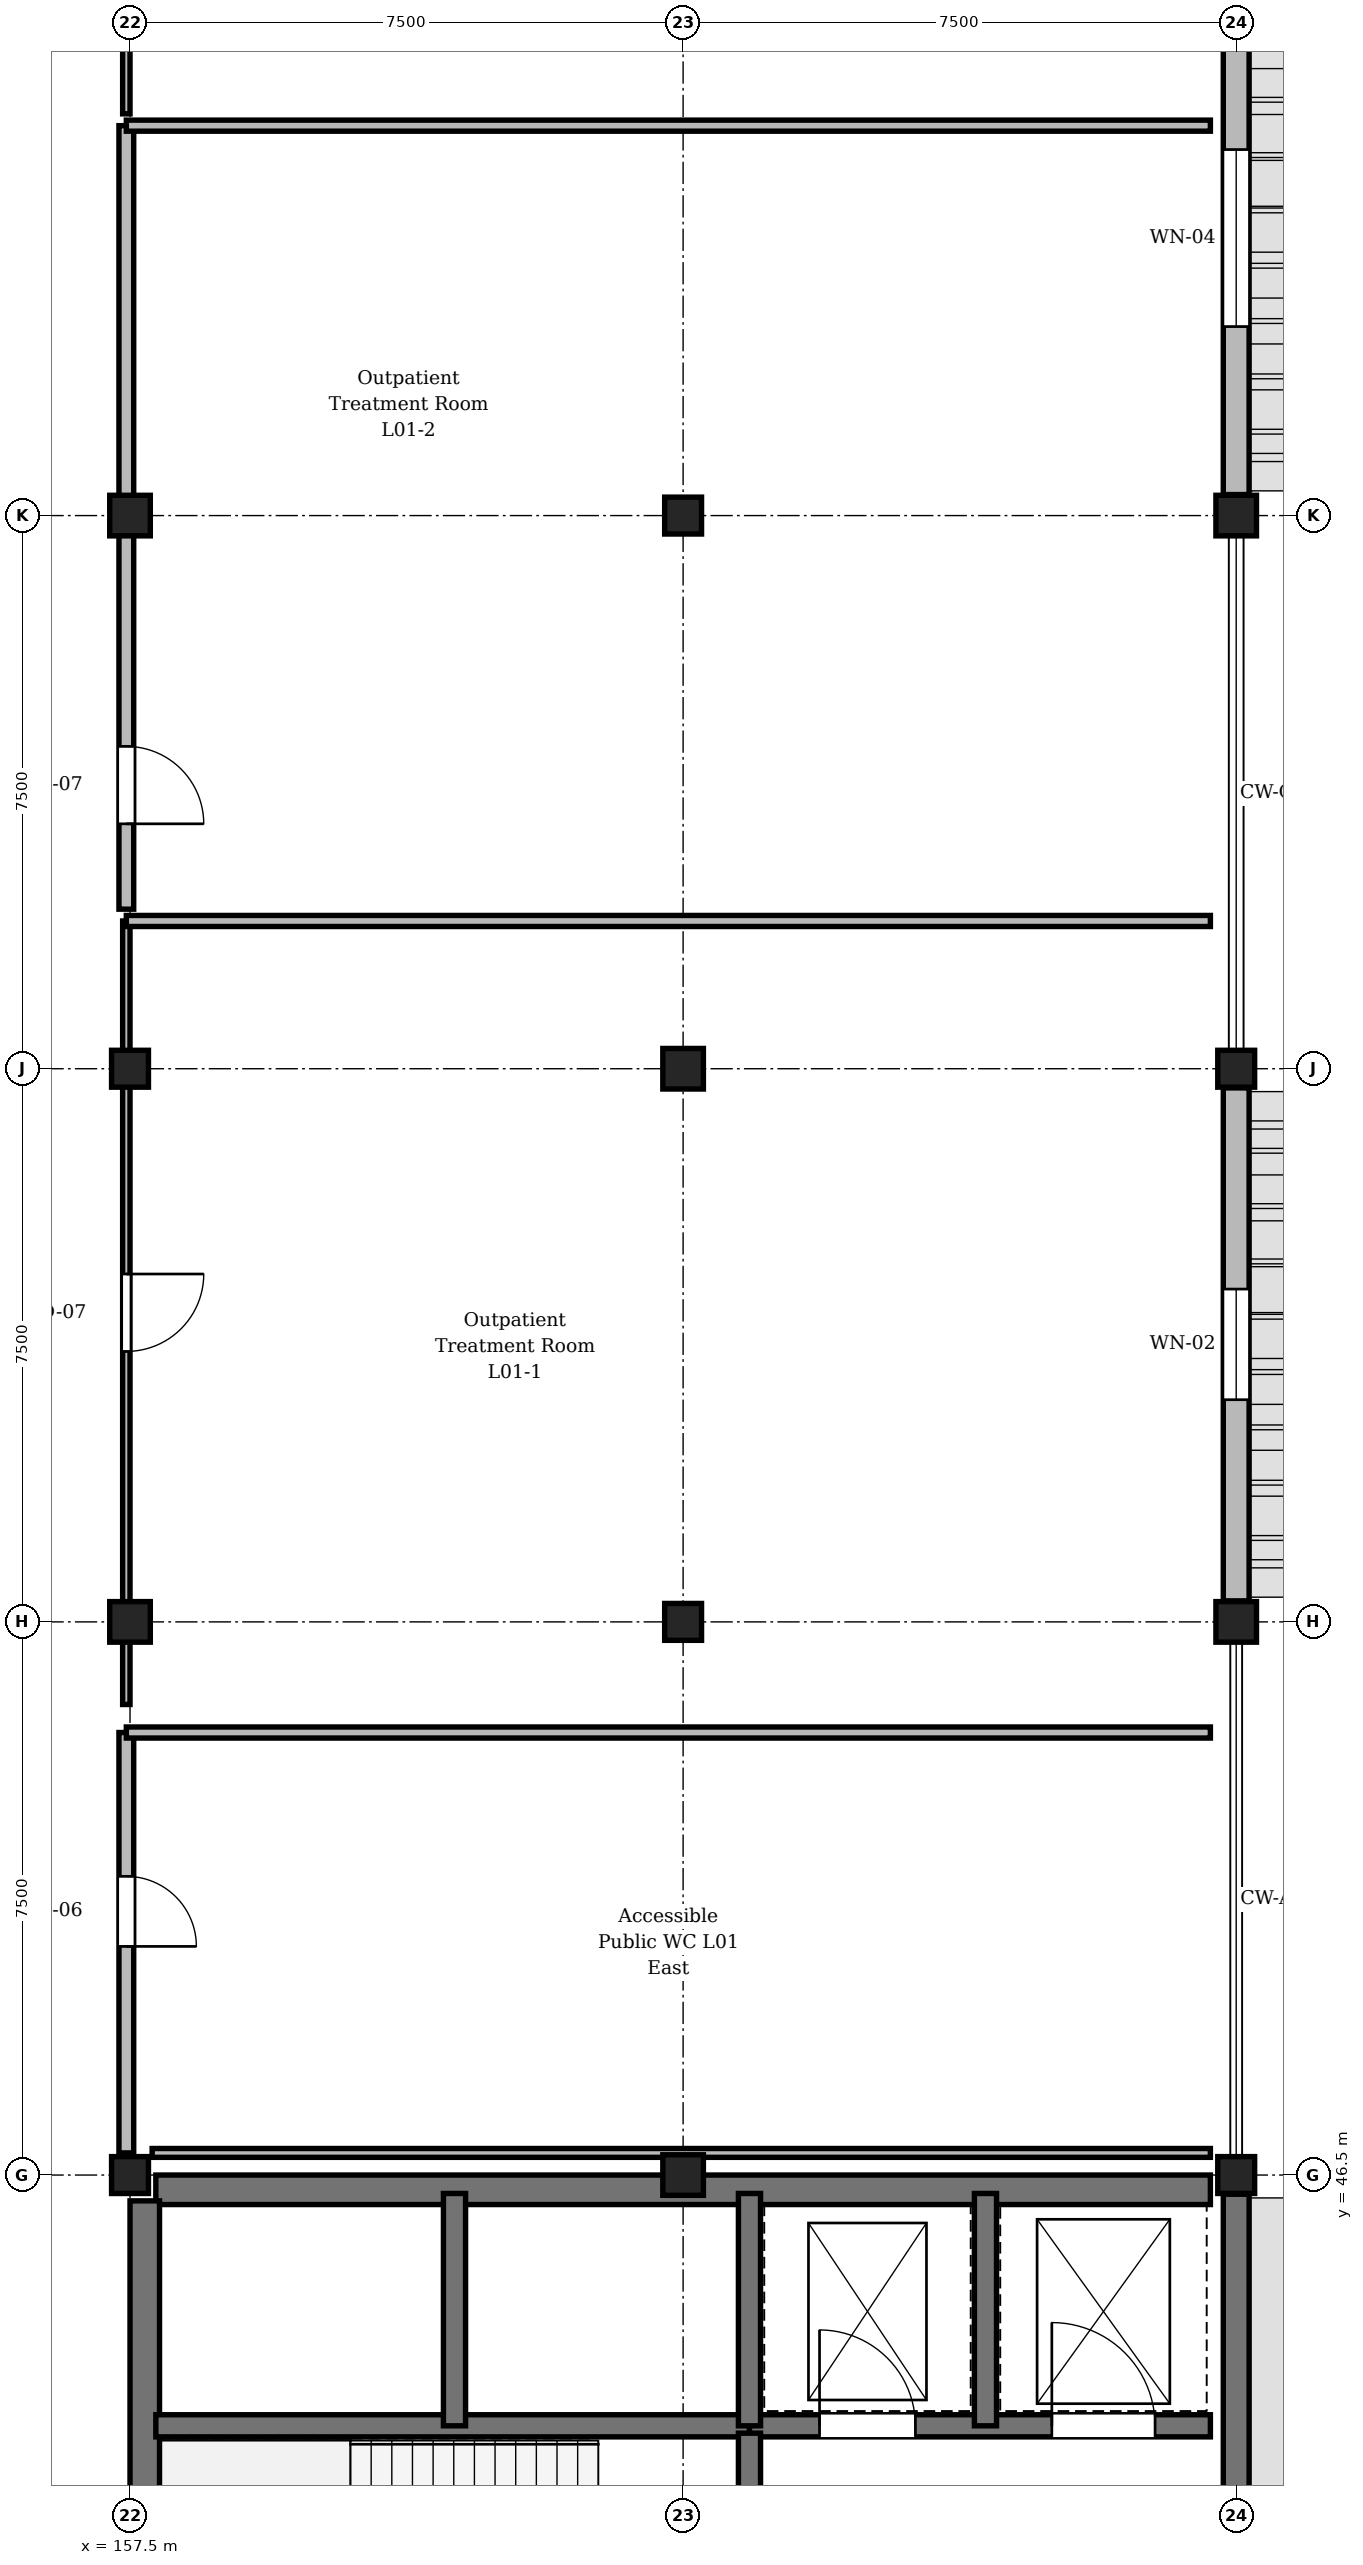
"""IFC4 building model, lengths in metres.
Left out: names, types, materials, properties, quantities, classifications, styles, units other than length and angle.
Written with IfcOpenShell. Run it as: python <this file> out.ifc"""

import sys

from ifc_helpers import new_model, si_unit, direction, frame, frame_2d, origin, origin_2d, place, context, subcontext, project, spatial, rectangle, extrude, element, fill, save


model = new_model("IFC4")
c1 = context("Model", 3, precision=1e-05, world=origin(), true_north=direction((0.0, 1.0)))
c2 = subcontext(c1, "Body", "Model", "MODEL_VIEW")
j1 = project(units=[si_unit("LENGTHUNIT", "METRE"), si_unit("PLANEANGLEUNIT", "RADIAN")], contexts=[c1])
p1 = place(None, origin())
s1 = spatial("IfcSite", under=j1, at=p1, CompositionType="ELEMENT")
p2 = place(p1, origin())
s2 = spatial("IfcBuilding", under=s1, at=p2, CompositionType="ELEMENT")
p3 = place(p2, frame((0.0, 0.0, 4.8)))
s3 = spatial("IfcBuildingStorey", under=s2, at=p3, CompositionType="ELEMENT", Elevation=4.8)
p4 = place(p3, frame((157.5, 46.5, 0.0), z_axis=(0.0, 0.0, 1.0), x_axis=(1.0, 0.0, 0.0)))
e1 = element("IfcColumn", 1, at=p4, inside=s3, PredefinedType="COLUMN", context=c2, shape_type="SweptSolid", body=[
    extrude(rectangle(XDim=0.5, YDim=0.5, at=origin_2d()), origin(), (0.0, 0.0, 1.0), 4.5),
])
p5 = place(p3, frame((157.5, 54.0, 0.0), z_axis=(0.0, 0.0, 1.0), x_axis=(1.0, 0.0, 0.0)))
e2 = element("IfcColumn", 2, at=p5, inside=s3, PredefinedType="COLUMN", context=c2, shape_type="SweptSolid", body=[
    extrude(rectangle(XDim=0.55, YDim=0.55, at=origin_2d()), origin(), (0.0, 0.0, 1.0), 4.5),
])
p6 = place(p3, frame((157.5, 61.5, 0.0), z_axis=(0.0, 0.0, 1.0), x_axis=(1.0, 0.0, 0.0)))
e3 = element("IfcColumn", 3, at=p6, inside=s3, PredefinedType="COLUMN", context=c2, shape_type="SweptSolid", body=[
    extrude(rectangle(XDim=0.5, YDim=0.5, at=origin_2d()), origin(), (0.0, 0.0, 1.0), 4.5),
])
for number, where, z_axis, x_axis in (
    (4, (157.5, 69.0, 0.0), (0.0, 0.0, 1.0), (1.0, 0.0, 0.0)),
    (5, (165.0, 46.5, 0.0), (0.0, 0.0, 1.0), (1.0, 0.0, 0.0)),
):
    element("IfcColumn", number, at=place(p3, frame(where, z_axis=z_axis, x_axis=x_axis)), inside=s3, PredefinedType="COLUMN", context=c2, shape_type="SweptSolid", body=[
        extrude(rectangle(XDim=0.55, YDim=0.55, at=origin_2d()), origin(), (0.0, 0.0, 1.0), 4.5),
    ])
p7 = place(p3, frame((165.0, 54.0, 0.0), z_axis=(0.0, 0.0, 1.0), x_axis=(1.0, 0.0, 0.0)))
e6 = element("IfcColumn", 6, at=p7, inside=s3, PredefinedType="COLUMN", context=c2, shape_type="SweptSolid", body=[
    extrude(rectangle(XDim=0.5, YDim=0.5, at=origin_2d()), origin(), (0.0, 0.0, 1.0), 4.5),
])
p8 = place(p3, frame((165.0, 61.5, 0.0), z_axis=(0.0, 0.0, 1.0), x_axis=(1.0, 0.0, 0.0)))
e7 = element("IfcColumn", 7, at=p8, inside=s3, PredefinedType="COLUMN", context=c2, shape_type="SweptSolid", body=[
    extrude(rectangle(XDim=0.55, YDim=0.55, at=origin_2d()), origin(), (0.0, 0.0, 1.0), 4.5),
])
for number, where, z_axis, x_axis in (
    (8, (165.0, 69.0, 0.0), (0.0, 0.0, 1.0), (1.0, 0.0, 0.0)),
    (9, (172.5, 46.5, 0.0), (0.0, 0.0, 1.0), (1.0, 0.0, 0.0)),
):
    element("IfcColumn", number, at=place(p3, frame(where, z_axis=z_axis, x_axis=x_axis)), inside=s3, PredefinedType="COLUMN", context=c2, shape_type="SweptSolid", body=[
        extrude(rectangle(XDim=0.5, YDim=0.5, at=origin_2d()), origin(), (0.0, 0.0, 1.0), 4.5),
    ])
p9 = place(p3, frame((172.5, 54.0, 0.0), z_axis=(0.0, 0.0, 1.0), x_axis=(1.0, 0.0, 0.0)))
e10 = element("IfcColumn", 10, at=p9, inside=s3, PredefinedType="COLUMN", context=c2, shape_type="SweptSolid", body=[
    extrude(rectangle(XDim=0.55, YDim=0.55, at=origin_2d()), origin(), (0.0, 0.0, 1.0), 4.5),
])
p10 = place(p3, frame((172.5, 61.5, 0.0), z_axis=(0.0, 0.0, 1.0), x_axis=(1.0, 0.0, 0.0)))
e11 = element("IfcColumn", 11, at=p10, inside=s3, PredefinedType="COLUMN", context=c2, shape_type="SweptSolid", body=[
    extrude(rectangle(XDim=0.5, YDim=0.5, at=origin_2d()), origin(), (0.0, 0.0, 1.0), 4.5),
])
p11 = place(p3, frame((172.5, 69.0, 0.0), z_axis=(0.0, 0.0, 1.0), x_axis=(1.0, 0.0, 0.0)))
e12 = element("IfcColumn", 12, at=p11, inside=s3, PredefinedType="COLUMN", context=c2, shape_type="SweptSolid", body=[
    extrude(rectangle(XDim=0.55, YDim=0.55, at=origin_2d()), origin(), (0.0, 0.0, 1.0), 4.5),
])
p12 = place(p3, frame((172.5, 46.24, 0.0), z_axis=(0.0, 0.0, 1.0), x_axis=(0.0, -1.0, 0.0)))
e13 = element("IfcWall", 13, at=p12, inside=s3, PredefinedType="SHEAR", context=c2, shape_type="SweptSolid", body=[
    extrude(rectangle(XDim=6.955, YDim=0.35, at=frame_2d((3.478, 0.0))), origin(), (0.0, 0.0, 1.0), 4.18),
])
p13 = place(p3, frame((172.5, 61.24, 0.0), z_axis=(0.0, 0.0, 1.0), x_axis=(0.0, -1.0, 0.0)))
e14 = element("IfcWall", 14, at=p13, inside=s3, PredefinedType="STANDARD", context=c2, shape_type="SweptSolid", body=[
    extrude(rectangle(XDim=6.955, YDim=0.35, at=frame_2d((3.478, 0.0))), origin(), (0.0, 0.0, 1.0), 3.63),
])
p14 = place(p13, frame((2.728, 0.0, 0.9)))
e15 = element("IfcOpeningElement", 15, at=p14, cuts=e14, PredefinedType="OPENING", context=c2, shape_type="SweptSolid", body=[
    extrude(rectangle(XDim=1.5, YDim=2.4, at=frame_2d((0.75, 1.2))), frame((0.0, 0.185, 0.0), z_axis=(0.0, -1.0, 0.0), x_axis=(1.0, 0.0, 0.0)), (0.0, 0.0, 1.0), 0.37),
])
p15 = place(p3, frame((172.5, 76.24, 0.0), z_axis=(0.0, 0.0, 1.0), x_axis=(0.0, -1.0, 0.0)))
e16 = element("IfcWall", 16, at=p15, inside=s3, PredefinedType="STANDARD", context=c2, shape_type="SweptSolid", body=[
    extrude(rectangle(XDim=6.955, YDim=0.35, at=frame_2d((3.478, 0.0))), origin(), (0.0, 0.0, 1.0), 3.63),
])
p16 = place(p15, frame((2.278, 0.0, 0.9)))
e17 = element("IfcOpeningElement", 17, at=p16, cuts=e16, PredefinedType="OPENING", context=c2, shape_type="SweptSolid", body=[
    extrude(rectangle(XDim=2.4, YDim=2.45, at=frame_2d((1.2, 1.225))), frame((0.0, 0.185, 0.0), z_axis=(0.0, -1.0, 0.0), x_axis=(1.0, 0.0, 0.0)), (0.0, 0.0, 1.0), 0.37),
])
p17 = place(p3, frame((157.85, 46.3, 0.0), z_axis=(0.0, 0.0, 1.0), x_axis=(1.0, 0.0, 0.0)))
e18 = element("IfcWall", 18, at=p17, inside=s3, PredefinedType="SHEAR", context=c2, shape_type="SweptSolid", body=[
    extrude(rectangle(XDim=14.3, YDim=0.4, at=frame_2d((7.15, 0.0))), origin(), (0.0, 0.0, 1.0), 4.18),
])
p18 = place(p3, frame((157.7, 39.35, 0.0), z_axis=(0.0, 0.0, 1.0), x_axis=(0.0, 1.0, 0.0)))
e19 = element("IfcWall", 19, at=p18, inside=s3, PredefinedType="SHEAR", context=c2, shape_type="SweptSolid", body=[
    extrude(rectangle(XDim=6.8, YDim=0.4, at=frame_2d((3.4, 0.0))), origin(), (0.0, 0.0, 1.0), 4.18),
])
p19 = place(p3, frame((157.85, 43.1, 0.0), z_axis=(0.0, 0.0, 1.0), x_axis=(1.0, 0.0, 0.0)))
e20 = element("IfcWall", 20, at=p19, inside=s3, PredefinedType="SHEAR", context=c2, shape_type="SweptSolid", body=[
    extrude(rectangle(XDim=8.05, YDim=0.3, at=frame_2d((4.025, 0.0))), origin(), (0.0, 0.0, 1.0), 4.18),
])
p20 = place(p3, frame((165.9, 43.1, 0.0), z_axis=(0.0, 0.0, 1.0), x_axis=(1.0, 0.0, 0.0)))
e21 = element("IfcWall", 21, at=p20, inside=s3, PredefinedType="SHEAR", context=c2, shape_type="SweptSolid", body=[
    extrude(rectangle(XDim=6.25, YDim=0.3, at=frame_2d((3.125, 0.0))), origin(), (0.0, 0.0, 1.0), 4.18),
])
p21 = place(p20, frame((0.95, 0.0, 0.0)))
e22 = element("IfcOpeningElement", 22, at=p21, cuts=e21, PredefinedType="OPENING", context=c2, shape_type="SweptSolid", body=[
    extrude(rectangle(XDim=1.3, YDim=2.2, at=frame_2d((0.65, 1.1))), frame((0.0, 0.16, 0.0), z_axis=(0.0, -1.0, 0.0), x_axis=(1.0, 0.0, 0.0)), (0.0, 0.0, 1.0), 0.32),
])
p22 = place(p20, frame((4.1, 0.0, 0.0)))
e23 = element("IfcOpeningElement", 23, at=p22, cuts=e21, PredefinedType="OPENING", context=c2, shape_type="SweptSolid", body=[
    extrude(rectangle(XDim=1.4, YDim=2.25, at=frame_2d((0.7, 1.125))), frame((0.0, 0.16, 0.0), z_axis=(0.0, -1.0, 0.0), x_axis=(1.0, 0.0, 0.0)), (0.0, 0.0, 1.0), 0.32),
])
p23 = place(p3, frame((165.9, 43.0, 0.0), z_axis=(0.0, 0.0, 1.0), x_axis=(0.0, -1.0, 0.0)))
e24 = element("IfcWall", 24, at=p23, inside=s3, PredefinedType="SHEAR", context=c2, shape_type="SweptSolid", body=[
    extrude(rectangle(XDim=3.65, YDim=0.3, at=frame_2d((1.825, 0.0))), origin(), (0.0, 0.0, 1.0), 4.18),
])
p24 = place(p23, frame((1.22, 0.0, 0.0)))
e25 = element("IfcOpeningElement", 25, at=p24, cuts=e24, PredefinedType="OPENING", context=c2, shape_type="SweptSolid", body=[
    extrude(rectangle(XDim=1.2, YDim=2.25, at=frame_2d((0.6, 1.125))), frame((0.0, 0.16, 0.0), z_axis=(0.0, -1.0, 0.0), x_axis=(1.0, 0.0, 0.0)), (0.0, 0.0, 1.0), 0.32),
])
for number, where, z_axis, x_axis in (
    (26, (161.9, 43.1, 0.0), (0.0, 0.0, 1.0), (0.0, 1.0, 0.0)),
    (27, (165.9, 43.1, 0.0), (0.0, 0.0, 1.0), (0.0, 1.0, 0.0)),
    (28, (169.1, 43.1, 0.0), (0.0, 0.0, 1.0), (0.0, 1.0, 0.0)),
):
    element("IfcWall", number, at=place(p3, frame(where, z_axis=z_axis, x_axis=x_axis)), inside=s3, PredefinedType="SHEAR", context=c2, shape_type="SweptSolid", body=[
        extrude(rectangle(XDim=3.15, YDim=0.3, at=frame_2d((1.575, 0.0))), origin(), (0.0, 0.0, 1.0), 4.18),
    ])
p25 = place(p3, frame((157.45, 52.5, 0.0), z_axis=(0.0, 0.0, 1.0), x_axis=(0.0, -1.0, 0.0)))
e29 = element("IfcWall", 29, at=p25, inside=s3, PredefinedType="STANDARD", context=c2, shape_type="SweptSolid", body=[
    extrude(rectangle(XDim=5.7, YDim=0.2, at=frame_2d((2.85, 0.0))), origin(), (0.0, 0.0, 1.0), 3.565),
])
p26 = place(p25, frame((1.95, 0.0, 0.0)))
e30 = element("IfcOpeningElement", 30, at=p26, cuts=e29, PredefinedType="OPENING", context=c2, shape_type="SweptSolid", body=[
    extrude(rectangle(XDim=0.95, YDim=2.15, at=frame_2d((0.475, 1.075))), frame((0.0, 0.11, 0.0), z_axis=(0.0, -1.0, 0.0), x_axis=(1.0, 0.0, 0.0)), (0.0, 0.0, 1.0), 0.22),
])
p27 = place(p3, frame((157.45, 63.503, 0.0), z_axis=(0.0, 0.0, 1.0), x_axis=(0.0, -1.0, 0.0)))
e31 = element("IfcWall", 31, at=p27, inside=s3, PredefinedType="PARTITIONING", context=c2, shape_type="SweptSolid", body=[
    extrude(rectangle(XDim=10.624, YDim=0.1, at=frame_2d((5.312, 0.0))), origin(), (0.0, 0.0, 1.0), 3.565),
])
p28 = place(p27, frame((4.787, 0.0, 0.0)))
e32 = element("IfcOpeningElement", 32, at=p28, cuts=e31, PredefinedType="OPENING", context=c2, shape_type="SweptSolid", body=[
    extrude(rectangle(XDim=1.05, YDim=2.2, at=frame_2d((0.525, 1.1))), frame((0.0, 0.06, 0.0), z_axis=(0.0, -1.0, 0.0), x_axis=(1.0, 0.0, 0.0)), (0.0, 0.0, 1.0), 0.12),
])
p29 = place(p3, frame((157.45, 74.287, 0.0), z_axis=(0.0, 0.0, 1.0), x_axis=(0.0, -1.0, 0.0)))
e33 = element("IfcWall", 33, at=p29, inside=s3, PredefinedType="STANDARD", context=c2, shape_type="SweptSolid", body=[
    extrude(rectangle(XDim=10.623, YDim=0.2, at=frame_2d((5.312, 0.0))), origin(), (0.0, 0.0, 1.0), 3.565),
])
p30 = place(p29, frame((8.416, 0.0, 0.0)))
e34 = element("IfcOpeningElement", 34, at=p30, cuts=e33, PredefinedType="OPENING", context=c2, shape_type="SweptSolid", body=[
    extrude(rectangle(XDim=1.05, YDim=2.2, at=frame_2d((0.525, 1.1))), frame((0.0, 0.11, 0.0), z_axis=(0.0, -1.0, 0.0), x_axis=(1.0, 0.0, 0.0)), (0.0, 0.0, 1.0), 0.22),
])
p31 = place(p3, frame((157.45, 85.07, 0.0), z_axis=(0.0, 0.0, 1.0), x_axis=(0.0, -1.0, 0.0)))
e35 = element("IfcWall", 35, at=p31, inside=s3, PredefinedType="PARTITIONING", context=c2, shape_type="SweptSolid", body=[
    extrude(rectangle(XDim=10.623, YDim=0.1, at=frame_2d((5.312, 0.0))), origin(), (0.0, 0.0, 1.0), 3.465),
])
p32 = place(p31, frame((3.879, 0.0, 0.0)))
e36 = element("IfcOpeningElement", 36, at=p32, cuts=e35, PredefinedType="OPENING", context=c2, shape_type="SweptSolid", body=[
    extrude(rectangle(XDim=1.05, YDim=2.2, at=frame_2d((0.525, 1.1))), frame((0.0, 0.06, 0.0), z_axis=(0.0, -1.0, 0.0), x_axis=(1.0, 0.0, 0.0)), (0.0, 0.0, 1.0), 0.12),
])
for number, where, z_axis, x_axis in (
    (37, (157.45, 52.5, 0.0), (0.0, 0.0, 1.0), (1.0, 0.0, 0.0)),
    (38, (157.45, 63.503, 0.0), (0.0, 0.0, 1.0), (1.0, 0.0, 0.0)),
    (39, (157.45, 74.287, 0.0), (0.0, 0.0, 1.0), (1.0, 0.0, 0.0)),
):
    element("IfcWall", number, at=place(p3, frame(where, z_axis=z_axis, x_axis=x_axis)), inside=s3, PredefinedType="PARTITIONING", context=c2, shape_type="SweptSolid", body=[
        extrude(rectangle(XDim=14.7, YDim=0.15, at=frame_2d((7.35, 0.0))), origin(), (0.0, 0.0, 1.0), 4.165),
    ])
p33 = place(p3, frame((157.8, 46.8, 0.0), z_axis=(0.0, 0.0, 1.0), x_axis=(1.0, 0.0, 0.0)))
e40 = element("IfcWall", 40, at=p33, inside=s3, PredefinedType="PARTITIONING", context=c2, shape_type="SweptSolid", body=[
    extrude(rectangle(XDim=14.35, YDim=0.12, at=frame_2d((7.175, 0.0))), origin(), (0.0, 0.0, 1.0), 3.515),
])
p34 = place(p14, origin())
e41 = element("IfcWindow", 41, at=p34, inside=s3, PartitioningType="SINGLE_PANEL", PredefinedType="WINDOW", context=c2, shape_type="SweptSolid", body=[
    extrude(rectangle(XDim=1.5, YDim=2.4, at=frame_2d((0.75, 1.2))), frame((0.0, 0.03, 0.0), z_axis=(0.0, -1.0, 0.0), x_axis=(1.0, 0.0, 0.0)), (0.0, 0.0, 1.0), 0.06),
])
fill(e15, e41)
p35 = place(p16, origin())
e42 = element("IfcWindow", 42, at=p35, inside=s3, PartitioningType="SINGLE_PANEL", PredefinedType="WINDOW", context=c2, shape_type="SweptSolid", body=[
    extrude(rectangle(XDim=2.4, YDim=2.45, at=frame_2d((1.2, 1.225))), frame((0.0, 0.03, 0.0), z_axis=(0.0, -1.0, 0.0), x_axis=(1.0, 0.0, 0.0)), (0.0, 0.0, 1.0), 0.06),
])
fill(e17, e42)
p36 = place(p21, origin())
e43 = element("IfcDoor", 43, at=p36, inside=s3, OperationType="DOUBLE_DOOR_SLIDING", PredefinedType="DOOR", context=c2, shape_type="SweptSolid", body=[
    extrude(rectangle(XDim=1.3, YDim=2.2, at=frame_2d((0.65, 1.1))), frame((0.0, 0.025, 0.0), z_axis=(0.0, -1.0, 0.0), x_axis=(1.0, 0.0, 0.0)), (0.0, 0.0, 1.0), 0.05),
])
fill(e22, e43)
p37 = place(p22, origin())
e44 = element("IfcDoor", 44, at=p37, inside=s3, OperationType="DOUBLE_DOOR_SLIDING", PredefinedType="DOOR", context=c2, shape_type="SweptSolid", body=[
    extrude(rectangle(XDim=1.4, YDim=2.25, at=frame_2d((0.7, 1.125))), frame((0.0, 0.025, 0.0), z_axis=(0.0, -1.0, 0.0), x_axis=(1.0, 0.0, 0.0)), (0.0, 0.0, 1.0), 0.05),
])
fill(e23, e44)
p38 = place(p26, origin())
e45 = element("IfcDoor", 45, at=p38, inside=s3, OperationType="SINGLE_SWING_RIGHT", PredefinedType="DOOR", context=c2, shape_type="SweptSolid", body=[
    extrude(rectangle(XDim=0.95, YDim=2.15, at=frame_2d((0.475, 1.075))), frame((0.0, 0.025, 0.0), z_axis=(0.0, -1.0, 0.0), x_axis=(1.0, 0.0, 0.0)), (0.0, 0.0, 1.0), 0.05),
])
fill(e30, e45)
p39 = place(p28, origin())
e46 = element("IfcDoor", 46, at=p39, inside=s3, OperationType="SINGLE_SWING_LEFT", PredefinedType="DOOR", context=c2, shape_type="SweptSolid", body=[
    extrude(rectangle(XDim=1.05, YDim=2.2, at=frame_2d((0.525, 1.1))), frame((0.0, 0.025, 0.0), z_axis=(0.0, -1.0, 0.0), x_axis=(1.0, 0.0, 0.0)), (0.0, 0.0, 1.0), 0.05),
])
fill(e32, e46)
p40 = place(p30, origin())
e47 = element("IfcDoor", 47, at=p40, inside=s3, OperationType="SINGLE_SWING_RIGHT", PredefinedType="DOOR", context=c2, shape_type="SweptSolid", body=[
    extrude(rectangle(XDim=1.05, YDim=2.2, at=frame_2d((0.525, 1.1))), frame((0.0, 0.025, 0.0), z_axis=(0.0, -1.0, 0.0), x_axis=(1.0, 0.0, 0.0)), (0.0, 0.0, 1.0), 0.05),
])
fill(e34, e47)
save(model, sys.argv[1])
